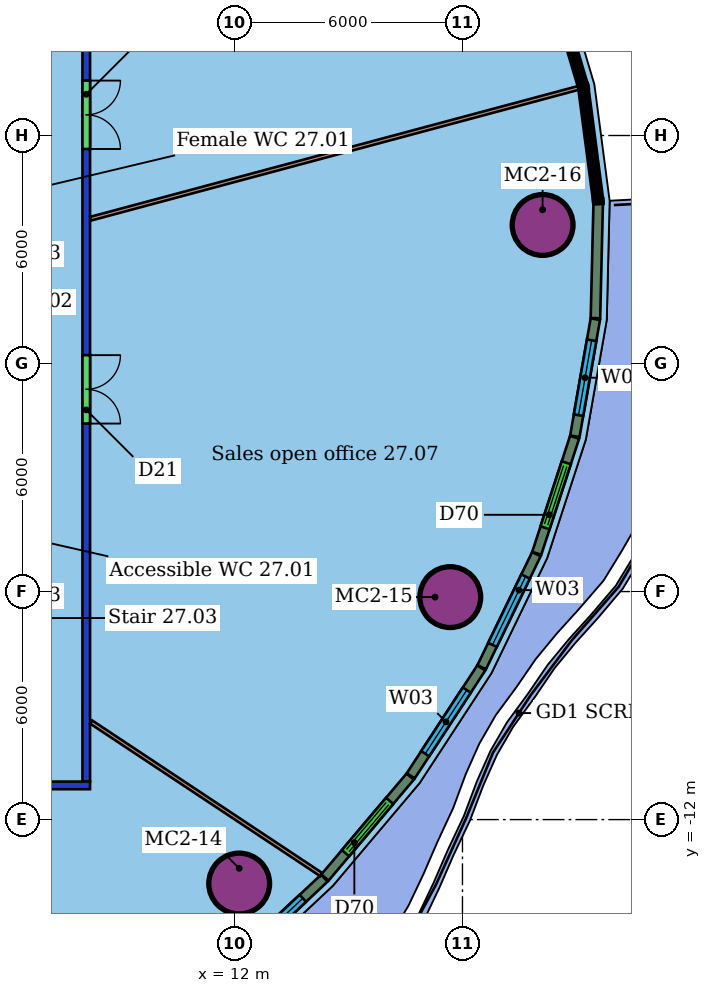
"""IFC4 building model, lengths in metres.
Left out: names, types, materials, properties, quantities, classifications, styles, units other than length and angle.
Written with IfcOpenShell. Run it as: python <this file> out.ifc"""

import sys

from ifc_helpers import new_model, si_unit, direction, frame, frame_2d, origin, origin_2d, place, context, subcontext, project, spatial, rectangle, hollow_circle, extrude, element, fill, save


model = new_model("IFC4")
c1 = context("Model", 3, precision=1e-05, world=origin(), true_north=direction((0.0, 1.0)))
c2 = subcontext(c1, "Body", "Model", "MODEL_VIEW")
j1 = project(units=[si_unit("LENGTHUNIT", "METRE"), si_unit("PLANEANGLEUNIT", "RADIAN")], contexts=[c1])
p1 = place(None, origin())
s1 = spatial("IfcSite", under=j1, at=p1, CompositionType="ELEMENT")
p2 = place(p1, origin())
s2 = spatial("IfcBuilding", under=s1, at=p2, CompositionType="ELEMENT")
p3 = place(p2, frame((0.0, 0.0, 117.4)))
s3 = spatial("IfcBuildingStorey", under=s2, at=p3, CompositionType="ELEMENT", Elevation=117.4)
for number, where, z_axis, x_axis in (
    (1, (12.125, -13.683, 0.0), (0.0, 0.0, 1.0), (1.0, 0.0, 0.0)),
    (2, (17.679, -6.146, 0.0), (0.0, 0.0, 1.0), (1.0, 0.0, 0.0)),
    (3, (20.109, 3.646, 0.0), (0.0, 0.0, 1.0), (1.0, 0.0, 0.0)),
):
    element("IfcColumn", number, at=place(p3, frame(where, z_axis=z_axis, x_axis=x_axis)), inside=s3, PredefinedType="COLUMN", context=c2, shape_type="SweptSolid", body=[
        extrude(hollow_circle(Radius=0.8, WallThickness=0.055, at=origin_2d()), origin(), (0.0, 0.0, 1.0), 3.45),
    ])
p4 = place(p3, frame((8.2, -11.1, 0.0), z_axis=(0.0, 0.0, 1.0), x_axis=(-1.0, 0.0, 0.0)))
e4 = element("IfcWall", 4, at=p4, inside=s3, PredefinedType="PARTITIONING", context=c2, shape_type="SweptSolid", body=[
    extrude(rectangle(XDim=28.4, YDim=0.2, at=frame_2d((14.2, 0.0))), origin(), (0.0, 0.0, 1.0), 3.0),
])
p5 = place(p4, frame((18.882, 0.0, 0.0)))
e5 = element("IfcOpeningElement", 5, at=p5, cuts=e4, PredefinedType="OPENING", context=c2, shape_type="SweptSolid", body=[
    extrude(rectangle(XDim=1.8, YDim=2.1, at=frame_2d((0.9, 1.05))), frame((0.0, 0.11, 0.0), z_axis=(0.0, -1.0, 0.0), x_axis=(1.0, 0.0, 0.0)), (0.0, 0.0, 1.0), 0.22),
])
p6 = place(p4, frame((9.322, 0.0, 0.0)))
e6 = element("IfcOpeningElement", 6, at=p6, cuts=e4, PredefinedType="OPENING", context=c2, shape_type="SweptSolid", body=[
    extrude(rectangle(XDim=1.8, YDim=2.1, at=frame_2d((0.9, 1.05))), frame((0.0, 0.11, 0.0), z_axis=(0.0, -1.0, 0.0), x_axis=(1.0, 0.0, 0.0)), (0.0, 0.0, 1.0), 0.22),
])
p7 = place(p3, frame((8.1, 11.0, 0.0), z_axis=(0.0, 0.0, 1.0), x_axis=(0.0, -1.0, 0.0)))
e7 = element("IfcWall", 7, at=p7, inside=s3, PredefinedType="PARTITIONING", context=c2, shape_type="SweptSolid", body=[
    extrude(rectangle(XDim=22.0, YDim=0.2, at=frame_2d((11.0, 0.0))), origin(), (0.0, 0.0, 1.0), 3.0),
])
p8 = place(p7, frame((10.779, 0.0, 0.0)))
e8 = element("IfcOpeningElement", 8, at=p8, cuts=e7, PredefinedType="OPENING", context=c2, shape_type="SweptSolid", body=[
    extrude(rectangle(XDim=1.8, YDim=2.1, at=frame_2d((0.9, 1.05))), frame((0.0, 0.11, 0.0), z_axis=(0.0, -1.0, 0.0), x_axis=(1.0, 0.0, 0.0)), (0.0, 0.0, 1.0), 0.22),
])
p9 = place(p7, frame((3.555, 0.0, 0.0)))
e9 = element("IfcOpeningElement", 9, at=p9, cuts=e7, PredefinedType="OPENING", context=c2, shape_type="SweptSolid", body=[
    extrude(rectangle(XDim=1.8, YDim=2.1, at=frame_2d((0.9, 1.05))), frame((0.0, 0.11, 0.0), z_axis=(0.0, -1.0, 0.0), x_axis=(1.0, 0.0, 0.0)), (0.0, 0.0, 1.0), 0.22),
])
p10 = place(p3, frame((14.283, -13.447, 0.0), z_axis=(0.0, 0.0, 1.0), x_axis=(-0.833484611181, 0.552542670682, 0.0)))
e10 = element("IfcWall", 10, at=p10, inside=s3, PredefinedType="PARTITIONING", context=c2, shape_type="SweptSolid", body=[
    extrude(rectangle(XDim=7.266, YDim=0.1, at=frame_2d((3.633, 0.0))), origin(), (0.0, 0.0, 1.0), 3.45),
])
p11 = place(p3, frame((21.055, 7.253, 0.0), z_axis=(0.0, 0.0, 1.0), x_axis=(-0.965888777638, -0.258957272989, 0.0)))
e11 = element("IfcWall", 11, at=p11, inside=s3, PredefinedType="PARTITIONING", context=c2, shape_type="SweptSolid", body=[
    extrude(rectangle(XDim=13.296, YDim=0.1, at=frame_2d((6.648, 0.0))), origin(), (0.0, 0.0, 1.0), 3.45),
])
p12 = place(p3, frame((11.774, -15.968, 0.0), z_axis=(0.0, 0.0, 1.0), x_axis=(0.729895135737, 0.683559134843, 0.0)))
e12 = element("IfcWall", 12, at=p12, inside=s3, PredefinedType="SOLIDWALL", context=c2, shape_type="SweptSolid", body=[
    extrude(rectangle(XDim=3.551, YDim=0.25, at=frame_2d((1.776, 0.0))), origin(), (0.0, 0.0, 1.0), 3.05),
])
p13 = place(p12, frame((0.776, 0.0, 0.9)))
e13 = element("IfcOpeningElement", 13, at=p13, cuts=e12, PredefinedType="OPENING", context=c2, shape_type="SweptSolid", body=[
    extrude(rectangle(XDim=2.0, YDim=2.1, at=frame_2d((1.0, 1.05))), frame((0.0, 0.135, 0.0), z_axis=(0.0, -1.0, 0.0), x_axis=(1.0, 0.0, 0.0)), (0.0, 0.0, 1.0), 0.27),
])
p14 = place(p3, frame((14.381, -13.524, 0.0), z_axis=(0.0, 0.0, 1.0), x_axis=(0.645164421971, 0.764043760934, 0.0)))
e14 = element("IfcWall", 14, at=p14, inside=s3, PredefinedType="SOLIDWALL", context=c2, shape_type="SweptSolid", body=[
    extrude(rectangle(XDim=3.477, YDim=0.25, at=frame_2d((1.738, 0.0))), origin(), (0.0, 0.0, 1.0), 3.05),
])
p15 = place(p14, frame((0.839, 0.0, 0.0)))
e15 = element("IfcOpeningElement", 15, at=p15, cuts=e14, PredefinedType="OPENING", context=c2, shape_type="SweptSolid", body=[
    extrude(rectangle(XDim=1.8, YDim=2.4, at=frame_2d((0.9, 1.2))), frame((0.0, 0.135, 0.0), z_axis=(0.0, -1.0, 0.0), x_axis=(1.0, 0.0, 0.0)), (0.0, 0.0, 1.0), 0.27),
])
p16 = place(p3, frame((16.638, -10.849, 0.0), z_axis=(0.0, 0.0, 1.0), x_axis=(0.547270693195, 0.836955666908, 0.0)))
e16 = element("IfcWall", 16, at=p16, inside=s3, PredefinedType="SOLIDWALL", context=c2, shape_type="SweptSolid", body=[
    extrude(rectangle(XDim=3.392, YDim=0.25, at=frame_2d((1.696, 0.0))), origin(), (0.0, 0.0, 1.0), 3.05),
])
p17 = place(p16, frame((0.696, 0.0, 0.9)))
e17 = element("IfcOpeningElement", 17, at=p17, cuts=e16, PredefinedType="OPENING", context=c2, shape_type="SweptSolid", body=[
    extrude(rectangle(XDim=2.0, YDim=2.1, at=frame_2d((1.0, 1.05))), frame((0.0, 0.135, 0.0), z_axis=(0.0, -1.0, 0.0), x_axis=(1.0, 0.0, 0.0)), (0.0, 0.0, 1.0), 0.27),
])
p18 = place(p3, frame((18.507, -7.989, 0.0), z_axis=(0.0, 0.0, 1.0), x_axis=(0.435582187372, 0.900148964363, 0.0)))
e18 = element("IfcWall", 18, at=p18, inside=s3, PredefinedType="SOLIDWALL", context=c2, shape_type="SweptSolid", body=[
    extrude(rectangle(XDim=3.302, YDim=0.25, at=frame_2d((1.651, 0.0))), origin(), (0.0, 0.0, 1.0), 3.05),
])
p19 = place(p18, frame((0.651, 0.0, 0.9)))
e19 = element("IfcOpeningElement", 19, at=p19, cuts=e18, PredefinedType="OPENING", context=c2, shape_type="SweptSolid", body=[
    extrude(rectangle(XDim=2.0, YDim=2.1, at=frame_2d((1.0, 1.05))), frame((0.0, 0.135, 0.0), z_axis=(0.0, -1.0, 0.0), x_axis=(1.0, 0.0, 0.0)), (0.0, 0.0, 1.0), 0.27),
])
p20 = place(p3, frame((19.954, -4.993, 0.0), z_axis=(0.0, 0.0, 1.0), x_axis=(0.310270013997, 0.950648472578, 0.0)))
e20 = element("IfcWall", 20, at=p20, inside=s3, PredefinedType="SOLIDWALL", context=c2, shape_type="SweptSolid", body=[
    extrude(rectangle(XDim=3.212, YDim=0.25, at=frame_2d((1.606, 0.0))), origin(), (0.0, 0.0, 1.0), 3.05),
])
p21 = place(p20, frame((0.706, 0.0, 0.0)))
e21 = element("IfcOpeningElement", 21, at=p21, cuts=e20, PredefinedType="OPENING", context=c2, shape_type="SweptSolid", body=[
    extrude(rectangle(XDim=1.8, YDim=2.4, at=frame_2d((0.9, 1.2))), frame((0.0, 0.135, 0.0), z_axis=(0.0, -1.0, 0.0), x_axis=(1.0, 0.0, 0.0)), (0.0, 0.0, 1.0), 0.27),
])
p22 = place(p3, frame((20.957, -1.915, 0.0), z_axis=(0.0, 0.0, 1.0), x_axis=(0.172262996508, 0.985050993621, 0.0)))
e22 = element("IfcWall", 22, at=p22, inside=s3, PredefinedType="SOLIDWALL", context=c2, shape_type="SweptSolid", body=[
    extrude(rectangle(XDim=3.129, YDim=0.25, at=frame_2d((1.565, 0.0))), origin(), (0.0, 0.0, 1.0), 3.05),
])
p23 = place(p22, frame((0.565, 0.0, 0.9)))
e23 = element("IfcOpeningElement", 23, at=p23, cuts=e22, PredefinedType="OPENING", context=c2, shape_type="SweptSolid", body=[
    extrude(rectangle(XDim=2.0, YDim=2.1, at=frame_2d((1.0, 1.05))), frame((0.0, 0.135, 0.0), z_axis=(0.0, -1.0, 0.0), x_axis=(1.0, 0.0, 0.0)), (0.0, 0.0, 1.0), 0.27),
])
p24 = place(p3, frame((21.499, 1.194, 0.0), z_axis=(0.0, 0.0, 1.0), x_axis=(0.024099130641, 0.999709573777, 0.0)))
e24 = element("IfcWall", 24, at=p24, inside=s3, PredefinedType="SOLIDWALL", context=c2, shape_type="SweptSolid", body=[
    extrude(rectangle(XDim=3.019, YDim=0.25, at=frame_2d((1.51, 0.0))), origin(), (0.0, 0.0, 1.0), 3.05),
])
p25 = place(p8, origin())
e25 = element("IfcDoor", 25, at=p25, inside=s3, OperationType="DOUBLE_DOOR_SINGLE_SWING", PredefinedType="DOOR", context=c2, shape_type="SweptSolid", body=[
    extrude(rectangle(XDim=1.8, YDim=2.1, at=frame_2d((0.9, 1.05))), frame((0.0, 0.025, 0.0), z_axis=(0.0, -1.0, 0.0), x_axis=(1.0, 0.0, 0.0)), (0.0, 0.0, 1.0), 0.05),
])
fill(e8, e25)
p26 = place(p9, origin())
e26 = element("IfcDoor", 26, at=p26, inside=s3, OperationType="DOUBLE_DOOR_SINGLE_SWING", PredefinedType="DOOR", context=c2, shape_type="SweptSolid", body=[
    extrude(rectangle(XDim=1.8, YDim=2.1, at=frame_2d((0.9, 1.05))), frame((0.0, 0.025, 0.0), z_axis=(0.0, -1.0, 0.0), x_axis=(1.0, 0.0, 0.0)), (0.0, 0.0, 1.0), 0.05),
])
fill(e9, e26)
p27 = place(p13, origin())
e27 = element("IfcWindow", 27, at=p27, inside=s3, PartitioningType="SINGLE_PANEL", PredefinedType="WINDOW", context=c2, shape_type="SweptSolid", body=[
    extrude(rectangle(XDim=2.0, YDim=2.1, at=frame_2d((1.0, 1.05))), frame((0.0, 0.03, 0.0), z_axis=(0.0, -1.0, 0.0), x_axis=(1.0, 0.0, 0.0)), (0.0, 0.0, 1.0), 0.06),
])
fill(e13, e27)
p28 = place(p15, origin())
e28 = element("IfcDoor", 28, at=p28, inside=s3, OperationType="DOUBLE_DOOR_SLIDING", PredefinedType="DOOR", context=c2, shape_type="SweptSolid", body=[
    extrude(rectangle(XDim=1.8, YDim=2.4, at=frame_2d((0.9, 1.2))), frame((0.0, 0.025, 0.0), z_axis=(0.0, -1.0, 0.0), x_axis=(1.0, 0.0, 0.0)), (0.0, 0.0, 1.0), 0.05),
])
fill(e15, e28)
p29 = place(p17, origin())
e29 = element("IfcWindow", 29, at=p29, inside=s3, PartitioningType="SINGLE_PANEL", PredefinedType="WINDOW", context=c2, shape_type="SweptSolid", body=[
    extrude(rectangle(XDim=2.0, YDim=2.1, at=frame_2d((1.0, 1.05))), frame((0.0, 0.03, 0.0), z_axis=(0.0, -1.0, 0.0), x_axis=(1.0, 0.0, 0.0)), (0.0, 0.0, 1.0), 0.06),
])
fill(e17, e29)
p30 = place(p19, origin())
e30 = element("IfcWindow", 30, at=p30, inside=s3, PartitioningType="SINGLE_PANEL", PredefinedType="WINDOW", context=c2, shape_type="SweptSolid", body=[
    extrude(rectangle(XDim=2.0, YDim=2.1, at=frame_2d((1.0, 1.05))), frame((0.0, 0.03, 0.0), z_axis=(0.0, -1.0, 0.0), x_axis=(1.0, 0.0, 0.0)), (0.0, 0.0, 1.0), 0.06),
])
fill(e19, e30)
p31 = place(p21, origin())
e31 = element("IfcDoor", 31, at=p31, inside=s3, OperationType="DOUBLE_DOOR_SLIDING", PredefinedType="DOOR", context=c2, shape_type="SweptSolid", body=[
    extrude(rectangle(XDim=1.8, YDim=2.4, at=frame_2d((0.9, 1.2))), frame((0.0, 0.025, 0.0), z_axis=(0.0, -1.0, 0.0), x_axis=(1.0, 0.0, 0.0)), (0.0, 0.0, 1.0), 0.05),
])
fill(e21, e31)
p32 = place(p23, origin())
e32 = element("IfcWindow", 32, at=p32, inside=s3, PartitioningType="SINGLE_PANEL", PredefinedType="WINDOW", context=c2, shape_type="SweptSolid", body=[
    extrude(rectangle(XDim=2.0, YDim=2.1, at=frame_2d((1.0, 1.05))), frame((0.0, 0.03, 0.0), z_axis=(0.0, -1.0, 0.0), x_axis=(1.0, 0.0, 0.0)), (0.0, 0.0, 1.0), 0.06),
])
fill(e23, e32)
save(model, sys.argv[1])
